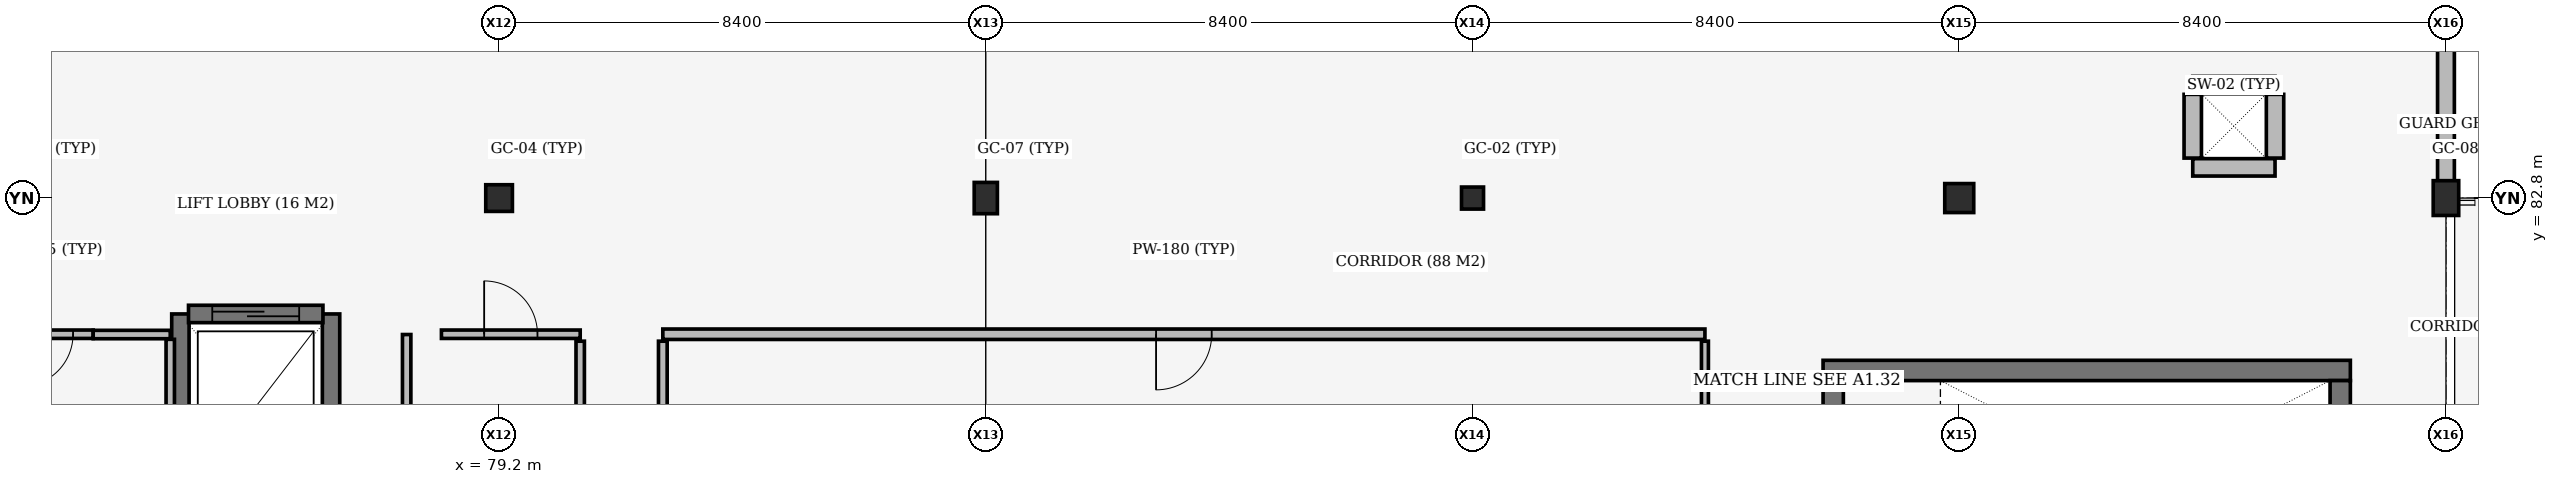
"""IFC4 building model, lengths in metres.
Left out: names, types, materials, properties, quantities, classifications, styles, units other than length and angle.
Written with IfcOpenShell. Run it as: python <this file> out.ifc"""

import sys

from ifc_helpers import new_model, si_unit, direction, frame, frame_2d, origin, origin_2d, place, context, subcontext, project, spatial, rectangle, extrude, element, fill, save


model = new_model("IFC4")
c1 = context("Model", 3, precision=1e-05, world=origin(), true_north=direction((0.0, 1.0)))
c2 = subcontext(c1, "Body", "Model", "MODEL_VIEW")
j1 = project(units=[si_unit("LENGTHUNIT", "METRE"), si_unit("PLANEANGLEUNIT", "RADIAN")], contexts=[c1])
p1 = place(None, origin())
s1 = spatial("IfcSite", under=j1, at=p1, CompositionType="ELEMENT")
p2 = place(p1, origin())
s2 = spatial("IfcBuilding", under=s1, at=p2, CompositionType="ELEMENT")
p3 = place(p2, frame((0.0, 0.0, 9.6)))
s3 = spatial("IfcBuildingStorey", under=s2, at=p3, CompositionType="ELEMENT", Elevation=9.6)
p4 = place(p3, frame((108.43, 83.33, 0.0), z_axis=(0.0, 0.0, 1.0), x_axis=(1.0, 0.0, 0.0)))
e1 = element("IfcWall", 1, at=p4, inside=s3, PredefinedType="SHEAR", context=c2, shape_type="SweptSolid", body=[
    extrude(rectangle(XDim=1.42, YDim=0.3, at=frame_2d((0.71, 0.0))), origin(), (0.0, 0.0, 1.0), 3.96),
])
p5 = place(p3, frame((109.85, 83.49, 0.0), z_axis=(0.0, 0.0, 1.0), x_axis=(0.0, 1.0, 0.0)))
e2 = element("IfcWall", 2, at=p5, inside=s3, PredefinedType="SHEAR", context=c2, shape_type="SweptSolid", body=[
    extrude(rectangle(XDim=1.1, YDim=0.3, at=frame_2d((0.55, 0.0))), origin(), (0.0, 0.0, 1.0), 3.96),
])
p6 = place(p3, frame((109.85, 84.75, 0.0), z_axis=(0.0, 0.0, 1.0), x_axis=(-1.0, 0.0, 0.0)))
e3 = element("IfcWall", 3, at=p6, inside=s3, PredefinedType="SHEAR", context=c2, shape_type="SweptSolid", body=[
    extrude(rectangle(XDim=1.42, YDim=0.3, at=frame_2d((0.71, 0.0))), origin(), (0.0, 0.0, 1.0), 3.96),
])
p7 = place(p3, frame((108.43, 84.59, 0.0), z_axis=(0.0, 0.0, 1.0), x_axis=(0.0, -1.0, 0.0)))
e4 = element("IfcWall", 4, at=p7, inside=s3, PredefinedType="SHEAR", context=c2, shape_type="SweptSolid", body=[
    extrude(rectangle(XDim=1.1, YDim=0.3, at=frame_2d((0.55, 0.0))), origin(), (0.0, 0.0, 1.0), 3.96),
])
p8 = place(p3, frame((79.2, 82.8, 0.0), z_axis=(0.0, 0.0, 1.0), x_axis=(1.0, 0.0, 0.0)))
e5 = element("IfcColumn", 5, at=p8, inside=s3, PredefinedType="COLUMN", context=c2, shape_type="SweptSolid", body=[
    extrude(rectangle(XDim=0.46, YDim=0.46, at=origin_2d()), origin(), (0.0, 0.0, 1.0), 3.96),
])
p9 = place(p3, frame((87.6, 82.8, 0.0), z_axis=(0.0, 0.0, 1.0), x_axis=(1.0, 0.0, 0.0)))
e6 = element("IfcColumn", 6, at=p9, inside=s3, PredefinedType="COLUMN", context=c2, shape_type="SweptSolid", body=[
    extrude(rectangle(XDim=0.4, YDim=0.54, at=origin_2d()), origin(), (0.0, 0.0, 1.0), 3.96),
])
p10 = place(p3, frame((96.0, 82.8, 0.0), z_axis=(0.0, 0.0, 1.0), x_axis=(1.0, 0.0, 0.0)))
e7 = element("IfcColumn", 7, at=p10, inside=s3, PredefinedType="COLUMN", context=c2, shape_type="SweptSolid", body=[
    extrude(rectangle(XDim=0.38, YDim=0.38, at=origin_2d()), origin(), (0.0, 0.0, 1.0), 3.96),
])
p11 = place(p3, frame((104.4, 82.8, 0.0), z_axis=(0.0, 0.0, 1.0), x_axis=(1.0, 0.0, 0.0)))
e8 = element("IfcColumn", 8, at=p11, inside=s3, PredefinedType="COLUMN", context=c2, shape_type="SweptSolid", body=[
    extrude(rectangle(XDim=0.5, YDim=0.5, at=origin_2d()), origin(), (0.0, 0.0, 1.0), 3.96),
])
p12 = place(p3, frame((112.8, 82.8, 0.0), z_axis=(0.0, 0.0, 1.0), x_axis=(1.0, 0.0, 0.0)))
e9 = element("IfcColumn", 9, at=p12, inside=s3, PredefinedType="COLUMN", context=c2, shape_type="SweptSolid", body=[
    extrude(rectangle(XDim=0.44, YDim=0.6, at=origin_2d()), origin(), (0.0, 0.0, 1.0), 3.96),
])
p13 = place(p3, frame((111.15, 79.825, 0.0), z_axis=(0.0, 0.0, 1.0), x_axis=(-1.0, 0.0, 0.0)))
e10 = element("IfcWall", 10, at=p13, inside=s3, PredefinedType="SHEAR", context=c2, shape_type="SweptSolid", body=[
    extrude(rectangle(XDim=9.1, YDim=0.35, at=frame_2d((4.55, 0.0))), origin(), (0.0, 0.0, 1.0), 3.96),
])
p14 = place(p3, frame((110.975, 76.2, 0.0), z_axis=(0.0, 0.0, 1.0), x_axis=(0.0, 1.0, 0.0)))
e11 = element("IfcWall", 11, at=p14, inside=s3, PredefinedType="SHEAR", context=c2, shape_type="SweptSolid", body=[
    extrude(rectangle(XDim=3.45, YDim=0.35, at=frame_2d((1.725, 0.0))), origin(), (0.0, 0.0, 1.0), 3.96),
])
for number, where, z_axis, x_axis in (
    (12, (73.7, 80.8, 0.0), (0.0, 0.0, 1.0), (0.0, -1.0, 0.0)),
    (13, (76.3, 77.6, 0.0), (0.0, 0.0, 1.0), (0.0, 1.0, 0.0)),
):
    element("IfcWall", number, at=place(p3, frame(where, z_axis=z_axis, x_axis=x_axis)), inside=s3, PredefinedType="SHEAR", context=c2, shape_type="SweptSolid", body=[
        extrude(rectangle(XDim=3.2, YDim=0.3, at=frame_2d((1.6, 0.0))), origin(), (0.0, 0.0, 1.0), 3.64),
    ])
p15 = place(p3, frame((112.8, 86.243, 0.0), z_axis=(0.0, 0.0, 1.0), x_axis=(0.0, -1.0, 0.0)))
e14 = element("IfcWall", 14, at=p15, inside=s3, PredefinedType="STANDARD", context=c2, shape_type="SweptSolid", body=[
    extrude(rectangle(XDim=3.151, YDim=0.29, at=frame_2d((1.575, 0.0))), origin(), (0.0, 0.0, 1.0), 3.96),
])
p16 = place(p3, frame((102.225, 79.65, 0.0), z_axis=(0.0, 0.0, 1.0), x_axis=(0.0, -1.0, 0.0)))
e15 = element("IfcWall", 15, at=p16, inside=s3, PredefinedType="SHEAR", context=c2, shape_type="SweptSolid", body=[
    extrude(rectangle(XDim=3.45, YDim=0.35, at=frame_2d((1.725, 0.0))), origin(), (0.0, 0.0, 1.0), 3.96),
])
p17 = place(p16, frame((1.035, 0.0, 0.0)))
e16 = element("IfcOpeningElement", 16, at=p17, cuts=e15, PredefinedType="OPENING", context=c2, shape_type="SweptSolid", body=[
    extrude(rectangle(XDim=1.38, YDim=2.2, at=frame_2d((0.69, 1.1))), frame((0.0, 0.185, 0.0), z_axis=(0.0, -1.0, 0.0), x_axis=(1.0, 0.0, 0.0)), (0.0, 0.0, 1.0), 0.37),
])
p18 = place(p3, frame((73.84, 80.8, 0.0), z_axis=(0.0, 0.0, 1.0), x_axis=(1.0, 0.0, 0.0)))
e17 = element("IfcWall", 17, at=p18, inside=s3, PredefinedType="SHEAR", context=c2, shape_type="SweptSolid", body=[
    extrude(rectangle(XDim=2.32, YDim=0.3, at=frame_2d((1.16, 0.0))), origin(), (0.0, 0.0, 1.0), 5.1),
])
p19 = place(p18, frame((0.41, 0.0, 0.0)))
e18 = element("IfcOpeningElement", 18, at=p19, cuts=e17, PredefinedType="OPENING", context=c2, shape_type="SweptSolid", body=[
    extrude(rectangle(XDim=1.5, YDim=2.2, at=frame_2d((0.75, 1.1))), frame((0.0, 0.16, 0.0), z_axis=(0.0, -1.0, 0.0), x_axis=(1.0, 0.0, 0.0)), (0.0, 0.0, 1.0), 0.32),
])
p20 = place(p3, frame((70.6, 80.45, 0.0), z_axis=(0.0, 0.0, 1.0), x_axis=(1.0, 0.0, 0.0)))
e19 = element("IfcWall", 19, at=p20, inside=s3, PredefinedType="PLUMBINGWALL", context=c2, shape_type="SweptSolid", body=[
    extrude(rectangle(XDim=1.595, YDim=0.145, at=frame_2d((0.797, 0.0))), origin(), (0.0, 0.0, 1.0), 3.96),
])
p21 = place(p20, frame((0.347, 0.0, 0.0)))
e20 = element("IfcOpeningElement", 20, at=p21, cuts=e19, PredefinedType="OPENING", context=c2, shape_type="SweptSolid", body=[
    extrude(rectangle(XDim=0.9, YDim=2.1, at=frame_2d((0.45, 1.05))), frame((0.0, 0.083, 0.0), z_axis=(0.0, -1.0, 0.0), x_axis=(1.0, 0.0, 0.0)), (0.0, 0.0, 1.0), 0.165),
])
p22 = place(p3, frame((78.205, 80.45, 0.0), z_axis=(0.0, 0.0, 1.0), x_axis=(1.0, 0.0, 0.0)))
e21 = element("IfcWall", 21, at=p22, inside=s3, PredefinedType="PLUMBINGWALL", context=c2, shape_type="SweptSolid", body=[
    extrude(rectangle(XDim=2.395, YDim=0.145, at=frame_2d((1.198, 0.0))), origin(), (0.0, 0.0, 1.0), 3.96),
])
p23 = place(p22, frame((0.738, 0.0, 0.0)))
e22 = element("IfcOpeningElement", 22, at=p23, cuts=e21, PredefinedType="OPENING", context=c2, shape_type="SweptSolid", body=[
    extrude(rectangle(XDim=0.92, YDim=2.1, at=frame_2d((0.46, 1.05))), frame((0.0, 0.083, 0.0), z_axis=(0.0, -1.0, 0.0), x_axis=(1.0, 0.0, 0.0)), (0.0, 0.0, 1.0), 0.165),
])
p24 = place(p3, frame((80.6, 76.55, 0.0), z_axis=(0.0, 0.0, 1.0), x_axis=(0.0, 1.0, 0.0)))
e23 = element("IfcWall", 23, at=p24, inside=s3, PredefinedType="PLUMBINGWALL", context=c2, shape_type="SweptSolid", body=[
    extrude(rectangle(XDim=3.78, YDim=0.145, at=frame_2d((1.89, 0.0))), origin(), (0.0, 0.0, 1.0), 3.96),
])
p25 = place(p3, frame((82.026, 80.45, 0.0), z_axis=(0.0, 0.0, 1.0), x_axis=(1.0, 0.0, 0.0)))
e24 = element("IfcWall", 24, at=p25, inside=s3, PredefinedType="PARTITIONING", context=c2, shape_type="SweptSolid", body=[
    extrude(rectangle(XDim=17.985, YDim=0.18, at=frame_2d((8.993, 0.0))), origin(), (0.0, 0.0, 1.0), 3.96),
])
p26 = place(p25, frame((8.512, 0.0, 0.0)))
e25 = element("IfcOpeningElement", 25, at=p26, cuts=e24, PredefinedType="OPENING", context=c2, shape_type="SweptSolid", body=[
    extrude(rectangle(XDim=0.96, YDim=2.15, at=frame_2d((0.48, 1.075))), frame((0.0, 0.1, 0.0), z_axis=(0.0, -1.0, 0.0), x_axis=(1.0, 0.0, 0.0)), (0.0, 0.0, 1.0), 0.2),
])
p27 = place(p3, frame((82.026, 75.85, 0.0), z_axis=(0.0, 0.0, 1.0), x_axis=(0.0, 1.0, 0.0)))
e26 = element("IfcWall", 26, at=p27, inside=s3, PredefinedType="PARTITIONING", context=c2, shape_type="SweptSolid", body=[
    extrude(rectangle(XDim=4.48, YDim=0.15, at=frame_2d((2.24, 0.0))), origin(), (0.0, 0.0, 1.0), 3.96),
])
p28 = place(p3, frame((100.011, 75.85, 0.0), z_axis=(0.0, 0.0, 1.0), x_axis=(0.0, 1.0, 0.0)))
e27 = element("IfcWall", 27, at=p28, inside=s3, PredefinedType="PARTITIONING", context=c2, shape_type="SweptSolid", body=[
    extrude(rectangle(XDim=4.48, YDim=0.12, at=frame_2d((2.24, 0.0))), origin(), (0.0, 0.0, 1.0), 3.96),
])
p29 = place(p3, frame((72.195, 80.445, 0.0), z_axis=(0.0, 0.0, 1.0), x_axis=(1.0, 0.0, 0.0)))
e28 = element("IfcWall", 28, at=p29, inside=s3, PredefinedType="PLUMBINGWALL", context=c2, shape_type="SweptSolid", body=[
    extrude(rectangle(XDim=1.33, YDim=0.145, at=frame_2d((0.665, 0.0))), origin(), (0.0, 0.0, 1.0), 3.96),
])
p30 = place(p3, frame((73.525, 76.637, 0.0), z_axis=(0.0, 0.0, 1.0), x_axis=(0.0, 1.0, 0.0)))
e29 = element("IfcWall", 29, at=p30, inside=s3, PredefinedType="PLUMBINGWALL", context=c2, shape_type="SweptSolid", body=[
    extrude(rectangle(XDim=3.725, YDim=0.145, at=frame_2d((1.863, 0.0))), origin(), (0.0, 0.0, 1.0), 3.96),
])
p31 = place(p3, frame((77.605, 76.555, 0.0), z_axis=(0.0, 0.0, 1.0), x_axis=(0.0, 1.0, 0.0)))
e30 = element("IfcWall", 30, at=p31, inside=s3, PredefinedType="PLUMBINGWALL", context=c2, shape_type="SweptSolid", body=[
    extrude(rectangle(XDim=3.89, YDim=0.145, at=frame_2d((1.945, 0.0))), origin(), (0.0, 0.0, 1.0), 3.96),
])
p32 = place(p19, origin())
e31 = element("IfcDoor", 31, at=p32, inside=s3, OperationType="SLIDING_TO_LEFT", PredefinedType="DOOR", context=c2, shape_type="SweptSolid", body=[
    extrude(rectangle(XDim=1.5, YDim=2.2, at=frame_2d((0.75, 1.1))), frame((0.0, 0.025, 0.0), z_axis=(0.0, -1.0, 0.0), x_axis=(1.0, 0.0, 0.0)), (0.0, 0.0, 1.0), 0.05),
])
fill(e18, e31)
p33 = place(p21, origin())
e32 = element("IfcDoor", 32, at=p33, inside=s3, OperationType="SINGLE_SWING_RIGHT", PredefinedType="DOOR", context=c2, shape_type="SweptSolid", body=[
    extrude(rectangle(XDim=0.9, YDim=2.1, at=frame_2d((0.45, 1.05))), frame((0.0, 0.025, 0.0), z_axis=(0.0, -1.0, 0.0), x_axis=(1.0, 0.0, 0.0)), (0.0, 0.0, 1.0), 0.05),
])
fill(e20, e32)
p34 = place(p23, origin())
e33 = element("IfcDoor", 33, at=p34, inside=s3, OperationType="SINGLE_SWING_LEFT", PredefinedType="DOOR", context=c2, shape_type="SweptSolid", body=[
    extrude(rectangle(XDim=0.92, YDim=2.1, at=frame_2d((0.46, 1.05))), frame((0.0, 0.025, 0.0), z_axis=(0.0, -1.0, 0.0), x_axis=(1.0, 0.0, 0.0)), (0.0, 0.0, 1.0), 0.05),
])
fill(e22, e33)
p35 = place(p26, origin())
e34 = element("IfcDoor", 34, at=p35, inside=s3, OperationType="SINGLE_SWING_RIGHT", PredefinedType="DOOR", context=c2, shape_type="SweptSolid", body=[
    extrude(rectangle(XDim=0.96, YDim=2.15, at=frame_2d((0.48, 1.075))), frame((0.0, 0.025, 0.0), z_axis=(0.0, -1.0, 0.0), x_axis=(1.0, 0.0, 0.0)), (0.0, 0.0, 1.0), 0.05),
])
fill(e25, e34)
save(model, sys.argv[1])
